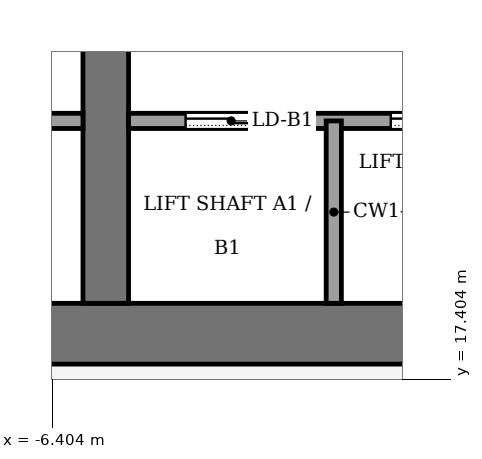
"""IFC4 building model, lengths in metres.
Left out: names, types, materials, properties, quantities, classifications, styles, units other than length and angle.
Written with IfcOpenShell. Run it as: python <this file> out.ifc"""

import sys

from ifc_helpers import new_model, si_unit, direction, frame, frame_2d, origin, place, context, subcontext, project, spatial, rectangle, extrude, element, fill, save


model = new_model("IFC4")
c1 = context("Model", 3, precision=1e-05, world=origin(), true_north=direction((0.0, 1.0)))
c2 = subcontext(c1, "Body", "Model", "MODEL_VIEW")
j1 = project(units=[si_unit("LENGTHUNIT", "METRE"), si_unit("PLANEANGLEUNIT", "RADIAN")], contexts=[c1])
p1 = place(None, origin())
s1 = spatial("IfcSite", under=j1, at=p1, CompositionType="ELEMENT")
p2 = place(p1, origin())
s2 = spatial("IfcBuilding", under=s1, at=p2, CompositionType="ELEMENT")
p3 = place(p2, frame((0.0, 0.0, 233.0)))
s3 = spatial("IfcBuildingStorey", under=s2, at=p3, CompositionType="ELEMENT", Elevation=233.0)
p4 = place(p3, frame((-13.4, 18.0, -0.13), z_axis=(0.0, 0.0, 1.0), x_axis=(1.0, 0.0, 0.0)))
e1 = element("IfcWall", 1, at=p4, inside=s3, PredefinedType="SHEAR", context=c2, shape_type="SweptSolid", body=[
    extrude(rectangle(XDim=26.8, YDim=0.8, at=frame_2d((13.4, 0.0))), origin(), (0.0, 0.0, 1.0), 5.0),
])
p5 = place(p3, frame((-5.7, 18.4, -0.13), z_axis=(0.0, 0.0, 1.0), x_axis=(0.0, 1.0, 0.0)))
e2 = element("IfcWall", 2, at=p5, inside=s3, PredefinedType="SHEAR", context=c2, shape_type="SweptSolid", body=[
    extrude(rectangle(XDim=19.2, YDim=0.6, at=frame_2d((9.6, 0.0))), origin(), (0.0, 0.0, 1.0), 5.0),
])
p6 = place(p5, frame((8.35, 0.0, 0.13)))
e3 = element("IfcOpeningElement", 3, at=p6, cuts=e2, PredefinedType="OPENING", context=c2, shape_type="SweptSolid", body=[
    extrude(rectangle(XDim=0.9, YDim=2.1, at=frame_2d((0.45, 1.05))), frame((0.0, 0.31, 0.0), z_axis=(0.0, -1.0, 0.0), x_axis=(1.0, 0.0, 0.0)), (0.0, 0.0, 1.0), 0.62),
])
p7 = place(p3, frame((-12.6, 20.8, 0.0), z_axis=(0.0, 0.0, 1.0), x_axis=(1.0, 0.0, 0.0)))
e4 = element("IfcWall", 4, at=p7, inside=s3, PredefinedType="PARTITIONING", context=c2, shape_type="SweptSolid", body=[
    extrude(rectangle(XDim=6.6, YDim=0.2, at=frame_2d((3.3, 0.0))), origin(), (0.0, 0.0, 1.0), 4.87),
])
p8 = place(p7, frame((2.8, 0.0, 0.0)))
e5 = element("IfcOpeningElement", 5, at=p8, cuts=e4, PredefinedType="OPENING", context=c2, shape_type="SweptSolid", body=[
    extrude(rectangle(XDim=1.0, YDim=2.1, at=frame_2d((0.5, 1.05))), frame((0.0, 0.11, 0.0), z_axis=(0.0, -1.0, 0.0), x_axis=(1.0, 0.0, 0.0)), (0.0, 0.0, 1.0), 0.22),
])
p9 = place(p3, frame((-5.4, 20.8, 0.0), z_axis=(0.0, 0.0, 1.0), x_axis=(1.0, 0.0, 0.0)))
e6 = element("IfcWall", 6, at=p9, inside=s3, PredefinedType="PARTITIONING", context=c2, shape_type="SweptSolid", body=[
    extrude(rectangle(XDim=10.8, YDim=0.2, at=frame_2d((5.4, 0.0))), origin(), (0.0, 0.0, 1.0), 4.87),
])
p10 = place(p9, frame((0.75, 0.0, 0.0)))
e7 = element("IfcOpeningElement", 7, at=p10, cuts=e6, PredefinedType="OPENING", context=c2, shape_type="SweptSolid", body=[
    extrude(rectangle(XDim=1.2, YDim=2.2, at=frame_2d((0.6, 1.1))), frame((0.0, 0.11, 0.0), z_axis=(0.0, -1.0, 0.0), x_axis=(1.0, 0.0, 0.0)), (0.0, 0.0, 1.0), 0.22),
])
p11 = place(p9, frame((3.45, 0.0, 0.0)))
e8 = element("IfcOpeningElement", 8, at=p11, cuts=e6, PredefinedType="OPENING", context=c2, shape_type="SweptSolid", body=[
    extrude(rectangle(XDim=1.2, YDim=2.2, at=frame_2d((0.6, 1.1))), frame((0.0, 0.11, 0.0), z_axis=(0.0, -1.0, 0.0), x_axis=(1.0, 0.0, 0.0)), (0.0, 0.0, 1.0), 0.22),
])
p12 = place(p9, frame((6.15, 0.0, 0.0)))
e9 = element("IfcOpeningElement", 9, at=p12, cuts=e6, PredefinedType="OPENING", context=c2, shape_type="SweptSolid", body=[
    extrude(rectangle(XDim=1.2, YDim=2.2, at=frame_2d((0.6, 1.1))), frame((0.0, 0.11, 0.0), z_axis=(0.0, -1.0, 0.0), x_axis=(1.0, 0.0, 0.0)), (0.0, 0.0, 1.0), 0.22),
])
p13 = place(p9, frame((8.85, 0.0, 0.0)))
e10 = element("IfcOpeningElement", 10, at=p13, cuts=e6, PredefinedType="OPENING", context=c2, shape_type="SweptSolid", body=[
    extrude(rectangle(XDim=1.2, YDim=2.2, at=frame_2d((0.6, 1.1))), frame((0.0, 0.11, 0.0), z_axis=(0.0, -1.0, 0.0), x_axis=(1.0, 0.0, 0.0)), (0.0, 0.0, 1.0), 0.22),
])
p14 = place(p3, frame((-2.7, 18.4, 0.0), z_axis=(0.0, 0.0, 1.0), x_axis=(0.0, 1.0, 0.0)))
e11 = element("IfcWall", 11, at=p14, inside=s3, PredefinedType="PARTITIONING", context=c2, shape_type="SweptSolid", body=[
    extrude(rectangle(XDim=2.4, YDim=0.2, at=frame_2d((1.2, 0.0))), origin(), (0.0, 0.0, 1.0), 4.87),
])
p15 = place(p10, origin())
e12 = element("IfcDoor", 12, at=p15, inside=s3, OperationType="SLIDING_TO_LEFT", PredefinedType="DOOR", context=c2, shape_type="SweptSolid", body=[
    extrude(rectangle(XDim=1.2, YDim=2.2, at=frame_2d((0.6, 1.1))), frame((0.0, 0.025, 0.0), z_axis=(0.0, -1.0, 0.0), x_axis=(1.0, 0.0, 0.0)), (0.0, 0.0, 1.0), 0.05),
])
fill(e7, e12)
p16 = place(p11, origin())
e13 = element("IfcDoor", 13, at=p16, inside=s3, OperationType="SLIDING_TO_LEFT", PredefinedType="DOOR", context=c2, shape_type="SweptSolid", body=[
    extrude(rectangle(XDim=1.2, YDim=2.2, at=frame_2d((0.6, 1.1))), frame((0.0, 0.025, 0.0), z_axis=(0.0, -1.0, 0.0), x_axis=(1.0, 0.0, 0.0)), (0.0, 0.0, 1.0), 0.05),
])
fill(e8, e13)
save(model, sys.argv[1])
